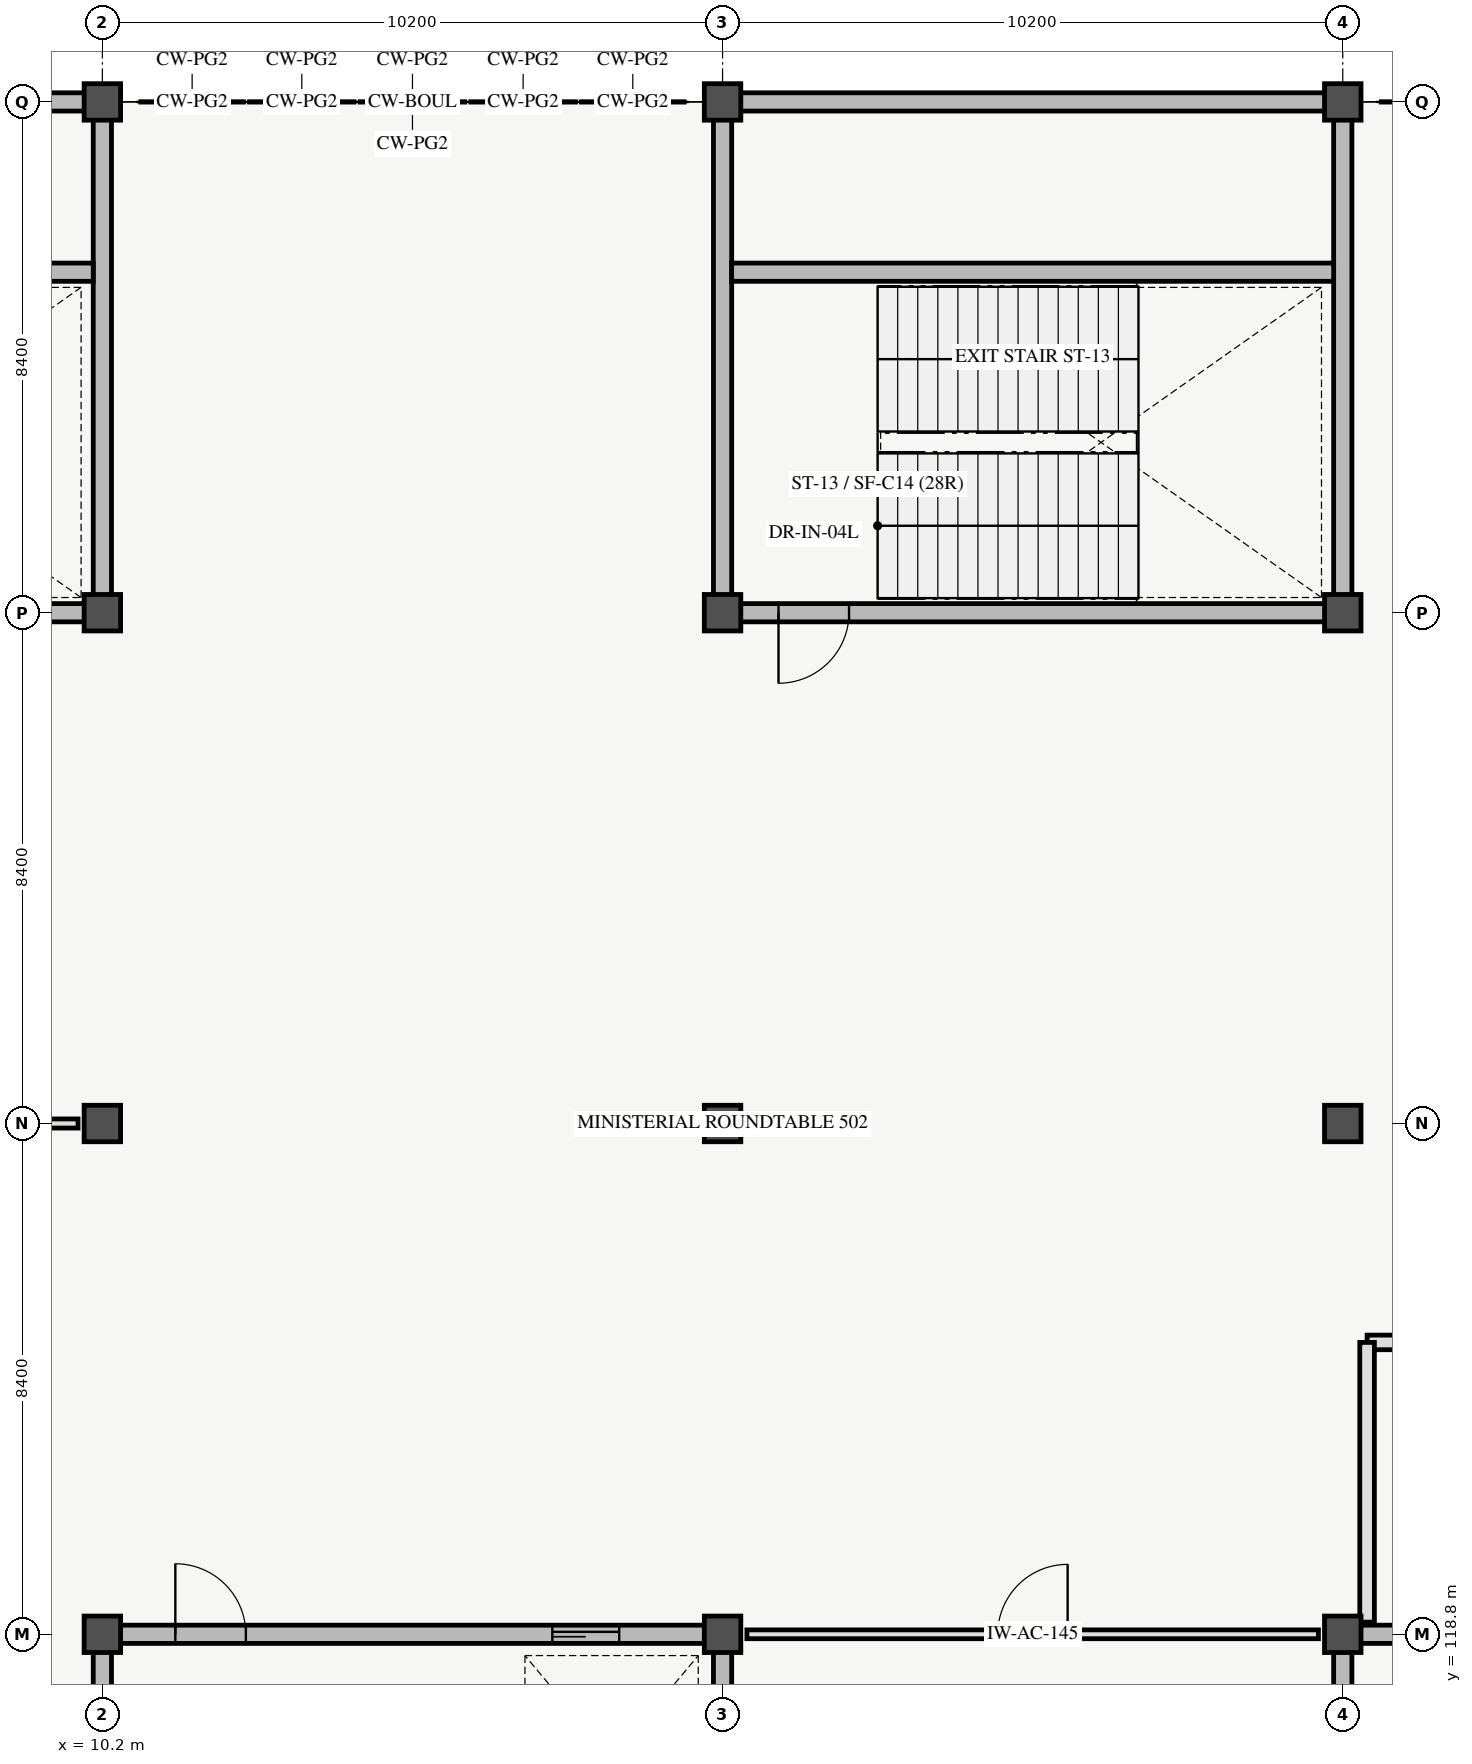
"""IFC4 building model, lengths in metres.
Left out: names, types, materials, properties, quantities, classifications, styles, units other than length and angle.
Written with IfcOpenShell. Run it as: python <this file> out.ifc"""

import sys

from ifc_helpers import new_model, si_unit, direction, frame, frame_2d, origin, origin_2d, place, context, subcontext, project, spatial, rectangle, extrude, element, fill, save


model = new_model("IFC4")
c1 = context("Model", 3, precision=1e-05, world=origin(), true_north=direction((0.0, 1.0)))
c2 = subcontext(c1, "Body", "Model", "MODEL_VIEW")
j1 = project(units=[si_unit("LENGTHUNIT", "METRE"), si_unit("PLANEANGLEUNIT", "RADIAN")], contexts=[c1])
p1 = place(None, origin())
s1 = spatial("IfcSite", under=j1, at=p1, CompositionType="ELEMENT")
p2 = place(p1, origin())
s2 = spatial("IfcBuilding", under=s1, at=p2, CompositionType="ELEMENT")
p3 = place(p2, frame((0.0, 0.0, 19.2)))
s3 = spatial("IfcBuildingStorey", under=s2, at=p3, CompositionType="ELEMENT", Elevation=19.2)
for number, where, z_axis, x_axis in (
    (1, (10.2, 118.8, 0.0), (0.0, 0.0, 1.0), (1.0, 0.0, 0.0)),
    (2, (10.2, 127.2, 0.0), (0.0, 0.0, 1.0), (1.0, 0.0, 0.0)),
    (3, (10.2, 135.6, 0.0), (0.0, 0.0, 1.0), (1.0, 0.0, 0.0)),
    (4, (10.2, 144.0, 0.0), (0.0, 0.0, 1.0), (1.0, 0.0, 0.0)),
    (5, (20.4, 118.8, 0.0), (0.0, 0.0, 1.0), (1.0, 0.0, 0.0)),
    (6, (20.4, 127.2, 0.0), (0.0, 0.0, 1.0), (1.0, 0.0, 0.0)),
    (7, (20.4, 135.6, 0.0), (0.0, 0.0, 1.0), (1.0, 0.0, 0.0)),
    (8, (20.4, 144.0, 0.0), (0.0, 0.0, 1.0), (1.0, 0.0, 0.0)),
    (9, (30.6, 118.8, 0.0), (0.0, 0.0, 1.0), (1.0, 0.0, 0.0)),
    (10, (30.6, 127.2, 0.0), (0.0, 0.0, 1.0), (1.0, 0.0, 0.0)),
    (11, (30.6, 135.6, 0.0), (0.0, 0.0, 1.0), (1.0, 0.0, 0.0)),
    (12, (30.6, 144.0, 0.0), (0.0, 0.0, 1.0), (1.0, 0.0, 0.0)),
):
    element("IfcColumn", number, at=place(p3, frame(where, z_axis=z_axis, x_axis=x_axis)), inside=s3, PredefinedType="COLUMN", context=c2, shape_type="SweptSolid", body=[
        extrude(rectangle(XDim=0.6, YDim=0.6, at=origin_2d()), origin(), (0.0, 0.0, 1.0), 4.2),
    ])
p4 = place(p3, frame((10.2, 118.8, 0.0), z_axis=(0.0, 0.0, 1.0), x_axis=(1.0, 0.0, 0.0)))
e13 = element("IfcWall", 13, at=p4, inside=s3, PredefinedType="SHEAR", context=c2, shape_type="SweptSolid", body=[
    extrude(rectangle(XDim=10.2, YDim=0.3, at=frame_2d((5.1, 0.0))), origin(), (0.0, 0.0, 1.0), 4.2),
])
p5 = place(p4, frame((1.2, 0.0, 0.0)))
e14 = element("IfcOpeningElement", 14, at=p5, cuts=e13, PredefinedType="OPENING", context=c2, shape_type="SweptSolid", body=[
    extrude(rectangle(XDim=1.16, YDim=2.2, at=frame_2d((0.58, 1.1))), frame((0.0, 0.16, 0.0), z_axis=(0.0, -1.0, 0.0), x_axis=(1.0, 0.0, 0.0)), (0.0, 0.0, 1.0), 0.32),
])
p6 = place(p4, frame((7.4, 0.0, 0.0)))
e15 = element("IfcOpeningElement", 15, at=p6, cuts=e13, PredefinedType="OPENING", context=c2, shape_type="SweptSolid", body=[
    extrude(rectangle(XDim=1.1, YDim=2.2, at=frame_2d((0.55, 1.1))), frame((0.0, 0.16, 0.0), z_axis=(0.0, -1.0, 0.0), x_axis=(1.0, 0.0, 0.0)), (0.0, 0.0, 1.0), 0.32),
])
for number, where, z_axis, x_axis in (
    (16, (10.2, 109.2, 0.0), (0.0, 0.0, 1.0), (0.0, 1.0, 0.0)),
    (17, (20.4, 109.2, 0.0), (0.0, 0.0, 1.0), (0.0, 1.0, 0.0)),
):
    element("IfcWall", number, at=place(p3, frame(where, z_axis=z_axis, x_axis=x_axis)), inside=s3, PredefinedType="SHEAR", context=c2, shape_type="SweptSolid", body=[
        extrude(rectangle(XDim=9.6, YDim=0.3, at=frame_2d((4.8, 0.0))), origin(), (0.0, 0.0, 1.0), 4.2),
    ])
p7 = place(p3, frame((30.6, 118.8, 0.0), z_axis=(0.0, 0.0, 1.0), x_axis=(1.0, 0.0, 0.0)))
e18 = element("IfcWall", 18, at=p7, inside=s3, PredefinedType="SHEAR", context=c2, shape_type="SweptSolid", body=[
    extrude(rectangle(XDim=10.2, YDim=0.3, at=frame_2d((5.1, 0.0))), origin(), (0.0, 0.0, 1.0), 4.2),
])
p8 = place(p7, frame((1.2, 0.0, 0.0)))
e19 = element("IfcOpeningElement", 19, at=p8, cuts=e18, PredefinedType="OPENING", context=c2, shape_type="SweptSolid", body=[
    extrude(rectangle(XDim=1.16, YDim=2.2, at=frame_2d((0.58, 1.1))), frame((0.0, 0.16, 0.0), z_axis=(0.0, -1.0, 0.0), x_axis=(1.0, 0.0, 0.0)), (0.0, 0.0, 1.0), 0.32),
])
p9 = place(p7, frame((7.4, 0.0, 0.0)))
e20 = element("IfcOpeningElement", 20, at=p9, cuts=e18, PredefinedType="OPENING", context=c2, shape_type="SweptSolid", body=[
    extrude(rectangle(XDim=1.2, YDim=2.25, at=frame_2d((0.6, 1.125))), frame((0.0, 0.16, 0.0), z_axis=(0.0, -1.0, 0.0), x_axis=(1.0, 0.0, 0.0)), (0.0, 0.0, 1.0), 0.32),
])
p10 = place(p3, frame((30.6, 109.2, 0.0), z_axis=(0.0, 0.0, 1.0), x_axis=(0.0, 1.0, 0.0)))
e21 = element("IfcWall", 21, at=p10, inside=s3, PredefinedType="SHEAR", context=c2, shape_type="SweptSolid", body=[
    extrude(rectangle(XDim=9.6, YDim=0.3, at=frame_2d((4.8, 0.0))), origin(), (0.0, 0.0, 1.0), 4.2),
])
p11 = place(p3, frame((20.4, 135.6, 0.0), z_axis=(0.0, 0.0, 1.0), x_axis=(1.0, 0.0, 0.0)))
e22 = element("IfcWall", 22, at=p11, inside=s3, PredefinedType="SHEAR", context=c2, shape_type="SweptSolid", body=[
    extrude(rectangle(XDim=10.2, YDim=0.3, at=frame_2d((5.1, 0.0))), origin(), (0.0, 0.0, 1.0), 4.2),
])
p12 = place(p11, frame((0.92, 0.0, 0.0)))
e23 = element("IfcOpeningElement", 23, at=p12, cuts=e22, PredefinedType="OPENING", context=c2, shape_type="SweptSolid", body=[
    extrude(rectangle(XDim=1.16, YDim=2.2, at=frame_2d((0.58, 1.1))), frame((0.0, 0.16, 0.0), z_axis=(0.0, -1.0, 0.0), x_axis=(1.0, 0.0, 0.0)), (0.0, 0.0, 1.0), 0.32),
])
p13 = place(p3, frame((20.4, 144.0, 0.0), z_axis=(0.0, 0.0, 1.0), x_axis=(1.0, 0.0, 0.0)))
e24 = element("IfcWall", 24, at=p13, inside=s3, PredefinedType="SHEAR", context=c2, shape_type="SweptSolid", body=[
    extrude(rectangle(XDim=10.2, YDim=0.3, at=frame_2d((5.1, 0.0))), origin(), (0.0, 0.0, 1.0), 4.2),
])
for number, where, z_axis, x_axis in (
    (25, (20.4, 135.6, 0.0), (0.0, 0.0, 1.0), (0.0, 1.0, 0.0)),
    (26, (30.6, 135.6, 0.0), (0.0, 0.0, 1.0), (0.0, 1.0, 0.0)),
):
    element("IfcWall", number, at=place(p3, frame(where, z_axis=z_axis, x_axis=x_axis)), inside=s3, PredefinedType="SHEAR", context=c2, shape_type="SweptSolid", body=[
        extrude(rectangle(XDim=8.4, YDim=0.3, at=frame_2d((4.2, 0.0))), origin(), (0.0, 0.0, 1.0), 4.2),
    ])
p14 = place(p3, frame((20.55, 141.2, 0.0), z_axis=(0.0, 0.0, 1.0), x_axis=(1.0, 0.0, 0.0)))
e27 = element("IfcWall", 27, at=p14, inside=s3, PredefinedType="SHEAR", context=c2, shape_type="SweptSolid", body=[
    extrude(rectangle(XDim=9.9, YDim=0.3, at=frame_2d((4.95, 0.0))), origin(), (0.0, 0.0, 1.0), 4.2),
])
p15 = place(p3, frame((0.0, 135.6, 0.0), z_axis=(0.0, 0.0, 1.0), x_axis=(1.0, 0.0, 0.0)))
e28 = element("IfcWall", 28, at=p15, inside=s3, PredefinedType="SHEAR", context=c2, shape_type="SweptSolid", body=[
    extrude(rectangle(XDim=10.2, YDim=0.3, at=frame_2d((5.1, 0.0))), origin(), (0.0, 0.0, 1.0), 4.2),
])
p16 = place(p15, frame((0.92, 0.0, 0.0)))
e29 = element("IfcOpeningElement", 29, at=p16, cuts=e28, PredefinedType="OPENING", context=c2, shape_type="SweptSolid", body=[
    extrude(rectangle(XDim=1.16, YDim=2.2, at=frame_2d((0.58, 1.1))), frame((0.0, 0.16, 0.0), z_axis=(0.0, -1.0, 0.0), x_axis=(1.0, 0.0, 0.0)), (0.0, 0.0, 1.0), 0.32),
])
p17 = place(p3, frame((0.0, 144.0, 0.0), z_axis=(0.0, 0.0, 1.0), x_axis=(1.0, 0.0, 0.0)))
e30 = element("IfcWall", 30, at=p17, inside=s3, PredefinedType="SHEAR", context=c2, shape_type="SweptSolid", body=[
    extrude(rectangle(XDim=10.2, YDim=0.3, at=frame_2d((5.1, 0.0))), origin(), (0.0, 0.0, 1.0), 4.2),
])
p18 = place(p3, frame((10.2, 135.6, 0.0), z_axis=(0.0, 0.0, 1.0), x_axis=(0.0, 1.0, 0.0)))
e31 = element("IfcWall", 31, at=p18, inside=s3, PredefinedType="SHEAR", context=c2, shape_type="SweptSolid", body=[
    extrude(rectangle(XDim=8.4, YDim=0.3, at=frame_2d((4.2, 0.0))), origin(), (0.0, 0.0, 1.0), 4.2),
])
p19 = place(p3, frame((0.15, 141.2, 0.0), z_axis=(0.0, 0.0, 1.0), x_axis=(1.0, 0.0, 0.0)))
e32 = element("IfcWall", 32, at=p19, inside=s3, PredefinedType="SHEAR", context=c2, shape_type="SweptSolid", body=[
    extrude(rectangle(XDim=9.9, YDim=0.3, at=frame_2d((4.95, 0.0))), origin(), (0.0, 0.0, 1.0), 4.2),
])
p20 = place(p3, frame((31.0, 123.6, 0.0), z_axis=(0.0, 0.0, 1.0), x_axis=(1.0, 0.0, 0.0)))
e33 = element("IfcWall", 33, at=p20, inside=s3, PredefinedType="PARTITIONING", context=c2, shape_type="SweptSolid", body=[
    extrude(rectangle(XDim=9.4, YDim=0.24, at=frame_2d((4.7, 0.0))), origin(), (0.0, 0.0, 1.0), 3.06),
])
p21 = place(p20, frame((3.75, 0.0, 0.0)))
e34 = element("IfcOpeningElement", 34, at=p21, cuts=e33, PredefinedType="OPENING", context=c2, shape_type="SweptSolid", body=[
    extrude(rectangle(XDim=1.9, YDim=2.25, at=frame_2d((0.95, 1.125))), frame((0.0, 0.13, 0.0), z_axis=(0.0, -1.0, 0.0), x_axis=(1.0, 0.0, 0.0)), (0.0, 0.0, 1.0), 0.26),
])
p22 = place(p3, frame((31.0, 119.0, 0.0), z_axis=(0.0, 0.0, 1.0), x_axis=(0.0, 1.0, 0.0)))
e35 = element("IfcWall", 35, at=p22, inside=s3, PredefinedType="PARTITIONING", context=c2, shape_type="SweptSolid", body=[
    extrude(rectangle(XDim=4.6, YDim=0.24, at=frame_2d((2.3, 0.0))), origin(), (0.0, 0.0, 1.0), 3.06),
])
p23 = place(p3, frame((0.4, 127.2, 0.0), z_axis=(0.0, 0.0, 1.0), x_axis=(1.0, 0.0, 0.0)))
e36 = element("IfcWall", 36, at=p23, inside=s3, PredefinedType="MOVABLE", context=c2, shape_type="SweptSolid", body=[
    extrude(rectangle(XDim=9.4, YDim=0.15, at=frame_2d((4.7, 0.0))), origin(), (0.0, 0.0, 1.0), 3.06),
])
p24 = place(p23, frame((3.975, 0.0, 0.0)))
e37 = element("IfcOpeningElement", 37, at=p24, cuts=e36, PredefinedType="OPENING", context=c2, shape_type="SweptSolid", body=[
    extrude(rectangle(XDim=1.45, YDim=2.22, at=frame_2d((0.725, 1.11))), frame((0.0, 0.085, 0.0), z_axis=(0.0, -1.0, 0.0), x_axis=(1.0, 0.0, 0.0)), (0.0, 0.0, 1.0), 0.17),
])
p25 = place(p3, frame((20.8, 118.8, 0.0), z_axis=(0.0, 0.0, 1.0), x_axis=(1.0, 0.0, 0.0)))
e38 = element("IfcWall", 38, at=p25, inside=s3, PredefinedType="PARTITIONING", context=c2, shape_type="SweptSolid", body=[
    extrude(rectangle(XDim=9.4, YDim=0.145, at=frame_2d((4.7, 0.0))), origin(), (0.0, 0.0, 1.0), 3.06),
])
p26 = place(p25, frame((4.125, 0.0, 0.0)))
e39 = element("IfcOpeningElement", 39, at=p26, cuts=e38, PredefinedType="OPENING", context=c2, shape_type="SweptSolid", body=[
    extrude(rectangle(XDim=1.15, YDim=2.2, at=frame_2d((0.575, 1.1))), frame((0.0, 0.083, 0.0), z_axis=(0.0, -1.0, 0.0), x_axis=(1.0, 0.0, 0.0)), (0.0, 0.0, 1.0), 0.165),
])
p27 = place(p5, origin())
e40 = element("IfcDoor", 40, at=p27, inside=s3, OperationType="SINGLE_SWING_LEFT", PredefinedType="DOOR", context=c2, shape_type="SweptSolid", body=[
    extrude(rectangle(XDim=1.16, YDim=2.2, at=frame_2d((0.58, 1.1))), frame((0.0, 0.025, 0.0), z_axis=(0.0, -1.0, 0.0), x_axis=(1.0, 0.0, 0.0)), (0.0, 0.0, 1.0), 0.05),
])
fill(e14, e40)
p28 = place(p6, origin())
e41 = element("IfcDoor", 41, at=p28, inside=s3, OperationType="SLIDING_TO_RIGHT", PredefinedType="DOOR", context=c2, shape_type="SweptSolid", body=[
    extrude(rectangle(XDim=1.1, YDim=2.2, at=frame_2d((0.55, 1.1))), frame((0.0, 0.025, 0.0), z_axis=(0.0, -1.0, 0.0), x_axis=(1.0, 0.0, 0.0)), (0.0, 0.0, 1.0), 0.05),
])
fill(e15, e41)
p29 = place(p12, origin())
e42 = element("IfcDoor", 42, at=p29, inside=s3, OperationType="SINGLE_SWING_LEFT", PredefinedType="DOOR", context=c2, shape_type="SweptSolid", body=[
    extrude(rectangle(XDim=1.16, YDim=2.2, at=frame_2d((0.58, 1.1))), frame((0.0, 0.025, 0.0), z_axis=(0.0, -1.0, 0.0), x_axis=(1.0, 0.0, 0.0)), (0.0, 0.0, 1.0), 0.05),
])
fill(e23, e42)
p30 = place(p26, origin())
e43 = element("IfcDoor", 43, at=p30, inside=s3, OperationType="SINGLE_SWING_RIGHT", PredefinedType="DOOR", context=c2, shape_type="SweptSolid", body=[
    extrude(rectangle(XDim=1.15, YDim=2.2, at=frame_2d((0.575, 1.1))), frame((0.0, 0.025, 0.0), z_axis=(0.0, -1.0, 0.0), x_axis=(1.0, 0.0, 0.0)), (0.0, 0.0, 1.0), 0.05),
])
fill(e39, e43)
save(model, sys.argv[1])
